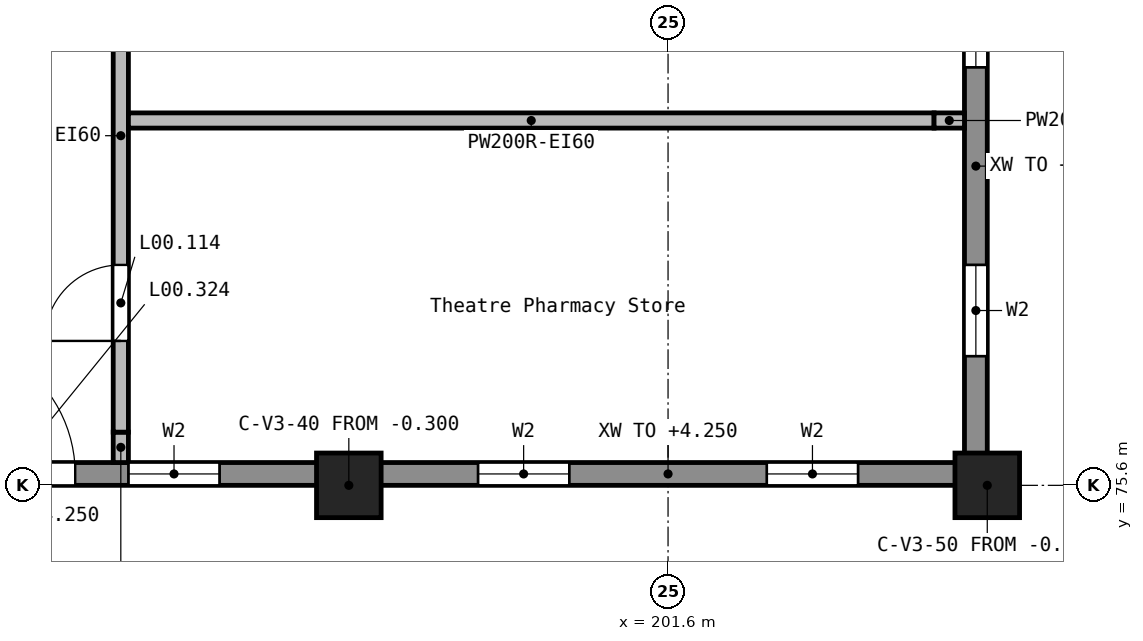
"""IFC4 building model, lengths in metres.
Left out: names, types, materials, properties, quantities, classifications, styles, units other than length and angle.
Written with IfcOpenShell. Run it as: python <this file> out.ifc"""

import sys

from ifc_helpers import new_model, si_unit, direction, frame, frame_2d, origin, origin_2d, place, context, subcontext, project, spatial, rectangle, extrude, element, fill, save


model = new_model("IFC4")
c1 = context("Model", 3, precision=1e-05, world=origin(), true_north=direction((0.0, 1.0)))
c2 = subcontext(c1, "Body", "Model", "MODEL_VIEW")
j1 = project(units=[si_unit("LENGTHUNIT", "METRE"), si_unit("PLANEANGLEUNIT", "RADIAN")], contexts=[c1])
p1 = place(None, origin())
s1 = spatial("IfcSite", under=j1, at=p1, CompositionType="ELEMENT")
p2 = place(p1, origin())
s2 = spatial("IfcBuilding", under=s1, at=p2, CompositionType="ELEMENT")
p3 = place(p2, origin())
s3 = spatial("IfcBuildingStorey", under=s2, at=p3, CompositionType="ELEMENT", Elevation=0.0)
for number, where, z_axis, x_axis in (
    (1, (197.4, 75.6, -0.3), (0.0, 0.0, 1.0), (1.0, 0.0, 0.0)),
    (2, (205.8, 75.6, -0.3), (0.0, 0.0, 1.0), (1.0, 0.0, 0.0)),
):
    element("IfcColumn", number, at=place(p3, frame(where, z_axis=z_axis, x_axis=x_axis)), inside=s3, PredefinedType="COLUMN", context=c2, shape_type="SweptSolid", body=[
        extrude(rectangle(XDim=0.85, YDim=0.85, at=origin_2d()), origin(), (0.0, 0.0, 1.0), 5.7),
    ])
p4 = place(p3, frame((189.4, 75.75, 0.0), z_axis=(0.0, 0.0, 1.0), x_axis=(1.0, 0.0, 0.0)))
e3 = element("IfcWall", 3, at=p4, inside=s3, PredefinedType="STANDARD", context=c2, shape_type="SweptSolid", body=[
    extrude(rectangle(XDim=7.6, YDim=0.3, at=frame_2d((3.8, 0.0))), origin(), (0.0, 0.0, 1.0), 4.25),
])
p5 = place(p4, frame((2.6, 0.0, 0.0)))
e4 = element("IfcOpeningElement", 4, at=p5, cuts=e3, PredefinedType="OPENING", context=c2, shape_type="SweptSolid", body=[
    extrude(rectangle(XDim=1.8, YDim=2.1, at=frame_2d((0.9, 1.05))), frame((0.0, 0.16, 0.0), z_axis=(0.0, -1.0, 0.0), x_axis=(1.0, 0.0, 0.0)), (0.0, 0.0, 1.0), 0.32),
])
p6 = place(p4, frame((5.1, 0.0, 1.2)))
e5 = element("IfcOpeningElement", 5, at=p6, cuts=e3, PredefinedType="OPENING", context=c2, shape_type="SweptSolid", body=[
    extrude(rectangle(XDim=1.2, YDim=1.2, at=frame_2d((0.6, 0.6))), frame((0.0, 0.16, 0.0), z_axis=(0.0, -1.0, 0.0), x_axis=(1.0, 0.0, 0.0)), (0.0, 0.0, 1.0), 0.32),
])
p7 = place(p3, frame((197.8, 75.75, 0.0), z_axis=(0.0, 0.0, 1.0), x_axis=(1.0, 0.0, 0.0)))
e6 = element("IfcWall", 6, at=p7, inside=s3, PredefinedType="STANDARD", context=c2, shape_type="SweptSolid", body=[
    extrude(rectangle(XDim=7.6, YDim=0.3, at=frame_2d((3.8, 0.0))), origin(), (0.0, 0.0, 1.0), 4.25),
])
p8 = place(p7, frame((1.3, 0.0, 1.2)))
e7 = element("IfcOpeningElement", 7, at=p8, cuts=e6, PredefinedType="OPENING", context=c2, shape_type="SweptSolid", body=[
    extrude(rectangle(XDim=1.2, YDim=1.2, at=frame_2d((0.6, 0.6))), frame((0.0, 0.16, 0.0), z_axis=(0.0, -1.0, 0.0), x_axis=(1.0, 0.0, 0.0)), (0.0, 0.0, 1.0), 0.32),
])
p9 = place(p7, frame((5.1, 0.0, 1.2)))
e8 = element("IfcOpeningElement", 8, at=p9, cuts=e6, PredefinedType="OPENING", context=c2, shape_type="SweptSolid", body=[
    extrude(rectangle(XDim=1.2, YDim=1.2, at=frame_2d((0.6, 0.6))), frame((0.0, 0.16, 0.0), z_axis=(0.0, -1.0, 0.0), x_axis=(1.0, 0.0, 0.0)), (0.0, 0.0, 1.0), 0.32),
])
p10 = place(p3, frame((205.65, 76.0, 0.0), z_axis=(0.0, 0.0, 1.0), x_axis=(0.0, 1.0, 0.0)))
e9 = element("IfcWall", 9, at=p10, inside=s3, PredefinedType="STANDARD", context=c2, shape_type="SweptSolid", body=[
    extrude(rectangle(XDim=7.6, YDim=0.3, at=frame_2d((3.8, 0.0))), origin(), (0.0, 0.0, 1.0), 4.25),
])
p11 = place(p10, frame((1.3, 0.0, 1.2)))
e10 = element("IfcOpeningElement", 10, at=p11, cuts=e9, PredefinedType="OPENING", context=c2, shape_type="SweptSolid", body=[
    extrude(rectangle(XDim=1.2, YDim=1.2, at=frame_2d((0.6, 0.6))), frame((0.0, 0.16, 0.0), z_axis=(0.0, -1.0, 0.0), x_axis=(1.0, 0.0, 0.0)), (0.0, 0.0, 1.0), 0.32),
])
p12 = place(p10, frame((5.1, 0.0, 1.2)))
e11 = element("IfcOpeningElement", 11, at=p12, cuts=e9, PredefinedType="OPENING", context=c2, shape_type="SweptSolid", body=[
    extrude(rectangle(XDim=1.2, YDim=1.2, at=frame_2d((0.6, 0.6))), frame((0.0, 0.16, 0.0), z_axis=(0.0, -1.0, 0.0), x_axis=(1.0, 0.0, 0.0)), (0.0, 0.0, 1.0), 0.32),
])
p13 = place(p3, frame((194.4, 75.9, 0.0), z_axis=(0.0, 0.0, 1.0), x_axis=(0.0, 1.0, 0.0)))
e12 = element("IfcWall", 12, at=p13, inside=s3, PredefinedType="SOLIDWALL", context=c2, shape_type="SweptSolid", body=[
    extrude(rectangle(XDim=0.4, YDim=0.2, at=frame_2d((0.2, 0.0))), origin(), (0.0, 0.0, 1.0), 4.28),
])
p14 = place(p3, frame((194.4, 76.3, 0.0), z_axis=(0.0, 0.0, 1.0), x_axis=(0.0, 1.0, 0.0)))
e13 = element("IfcWall", 13, at=p14, inside=s3, PredefinedType="SOLIDWALL", context=c2, shape_type="SweptSolid", body=[
    extrude(rectangle(XDim=7.8, YDim=0.2, at=frame_2d((3.9, 0.0))), origin(), (0.0, 0.0, 1.0), 5.05),
])
p15 = place(p14, frame((5.4, 0.0, 0.0)))
e14 = element("IfcOpeningElement", 14, at=p15, cuts=e13, PredefinedType="OPENING", context=c2, shape_type="SweptSolid", body=[
    extrude(rectangle(XDim=1.0, YDim=2.1, at=frame_2d((0.5, 1.05))), frame((0.0, 0.11, 0.0), z_axis=(0.0, -1.0, 0.0), x_axis=(1.0, 0.0, 0.0)), (0.0, 0.0, 1.0), 0.22),
])
p16 = place(p14, frame((1.2, 0.0, 0.0)))
e15 = element("IfcOpeningElement", 15, at=p16, cuts=e13, PredefinedType="OPENING", context=c2, shape_type="SweptSolid", body=[
    extrude(rectangle(XDim=1.0, YDim=2.1, at=frame_2d((0.5, 1.05))), frame((0.0, 0.11, 0.0), z_axis=(0.0, -1.0, 0.0), x_axis=(1.0, 0.0, 0.0)), (0.0, 0.0, 1.0), 0.22),
])
p17 = place(p3, frame((194.5, 80.4, 0.0), z_axis=(0.0, 0.0, 1.0), x_axis=(1.0, 0.0, 0.0)))
e16 = element("IfcWall", 16, at=p17, inside=s3, PredefinedType="SOLIDWALL", context=c2, shape_type="SweptSolid", body=[
    extrude(rectangle(XDim=10.6, YDim=0.2, at=frame_2d((5.3, 0.0))), origin(), (0.0, 0.0, 1.0), 5.05),
])
p18 = place(p3, frame((205.1, 80.4, 0.0), z_axis=(0.0, 0.0, 1.0), x_axis=(1.0, 0.0, 0.0)))
e17 = element("IfcWall", 17, at=p18, inside=s3, PredefinedType="SOLIDWALL", context=c2, shape_type="SweptSolid", body=[
    extrude(rectangle(XDim=0.4, YDim=0.2, at=frame_2d((0.2, 0.0))), origin(), (0.0, 0.0, 1.0), 4.28),
])
p19 = place(p5, frame((1.8, 0.0, 0.0), z_axis=(0.0, 0.0, 1.0), x_axis=(-1.0, 0.0, 0.0)))
e18 = element("IfcDoor", 18, at=p19, inside=s3, OperationType="SINGLE_SWING_LEFT", PredefinedType="DOOR", context=c2, shape_type="SweptSolid", body=[
    extrude(rectangle(XDim=1.8, YDim=2.1, at=frame_2d((0.9, 1.05))), frame((0.0, 0.025, 0.0), z_axis=(0.0, -1.0, 0.0), x_axis=(1.0, 0.0, 0.0)), (0.0, 0.0, 1.0), 0.05),
])
fill(e4, e18)
p20 = place(p6, origin())
e19 = element("IfcWindow", 19, at=p20, inside=s3, PartitioningType="SINGLE_PANEL", PredefinedType="WINDOW", context=c2, shape_type="SweptSolid", body=[
    extrude(rectangle(XDim=1.2, YDim=1.2, at=frame_2d((0.6, 0.6))), frame((0.0, 0.03, 0.0), z_axis=(0.0, -1.0, 0.0), x_axis=(1.0, 0.0, 0.0)), (0.0, 0.0, 1.0), 0.06),
])
fill(e5, e19)
p21 = place(p8, origin())
e20 = element("IfcWindow", 20, at=p21, inside=s3, PartitioningType="SINGLE_PANEL", PredefinedType="WINDOW", context=c2, shape_type="SweptSolid", body=[
    extrude(rectangle(XDim=1.2, YDim=1.2, at=frame_2d((0.6, 0.6))), frame((0.0, 0.03, 0.0), z_axis=(0.0, -1.0, 0.0), x_axis=(1.0, 0.0, 0.0)), (0.0, 0.0, 1.0), 0.06),
])
fill(e7, e20)
p22 = place(p9, origin())
e21 = element("IfcWindow", 21, at=p22, inside=s3, PartitioningType="SINGLE_PANEL", PredefinedType="WINDOW", context=c2, shape_type="SweptSolid", body=[
    extrude(rectangle(XDim=1.2, YDim=1.2, at=frame_2d((0.6, 0.6))), frame((0.0, 0.03, 0.0), z_axis=(0.0, -1.0, 0.0), x_axis=(1.0, 0.0, 0.0)), (0.0, 0.0, 1.0), 0.06),
])
fill(e8, e21)
p23 = place(p11, origin())
e22 = element("IfcWindow", 22, at=p23, inside=s3, PartitioningType="SINGLE_PANEL", PredefinedType="WINDOW", context=c2, shape_type="SweptSolid", body=[
    extrude(rectangle(XDim=1.2, YDim=1.2, at=frame_2d((0.6, 0.6))), frame((0.0, 0.03, 0.0), z_axis=(0.0, -1.0, 0.0), x_axis=(1.0, 0.0, 0.0)), (0.0, 0.0, 1.0), 0.06),
])
fill(e10, e22)
p24 = place(p12, origin())
e23 = element("IfcWindow", 23, at=p24, inside=s3, PartitioningType="SINGLE_PANEL", PredefinedType="WINDOW", context=c2, shape_type="SweptSolid", body=[
    extrude(rectangle(XDim=1.2, YDim=1.2, at=frame_2d((0.6, 0.6))), frame((0.0, 0.03, 0.0), z_axis=(0.0, -1.0, 0.0), x_axis=(1.0, 0.0, 0.0)), (0.0, 0.0, 1.0), 0.06),
])
fill(e11, e23)
p25 = place(p16, frame((1.0, 0.0, 0.0), z_axis=(0.0, 0.0, 1.0), x_axis=(-1.0, 0.0, 0.0)))
e24 = element("IfcDoor", 24, at=p25, inside=s3, OperationType="SINGLE_SWING_RIGHT", PredefinedType="DOOR", context=c2, shape_type="SweptSolid", body=[
    extrude(rectangle(XDim=1.0, YDim=2.1, at=frame_2d((0.5, 1.05))), frame((0.0, 0.025, 0.0), z_axis=(0.0, -1.0, 0.0), x_axis=(1.0, 0.0, 0.0)), (0.0, 0.0, 1.0), 0.05),
])
fill(e15, e24)
save(model, sys.argv[1])
